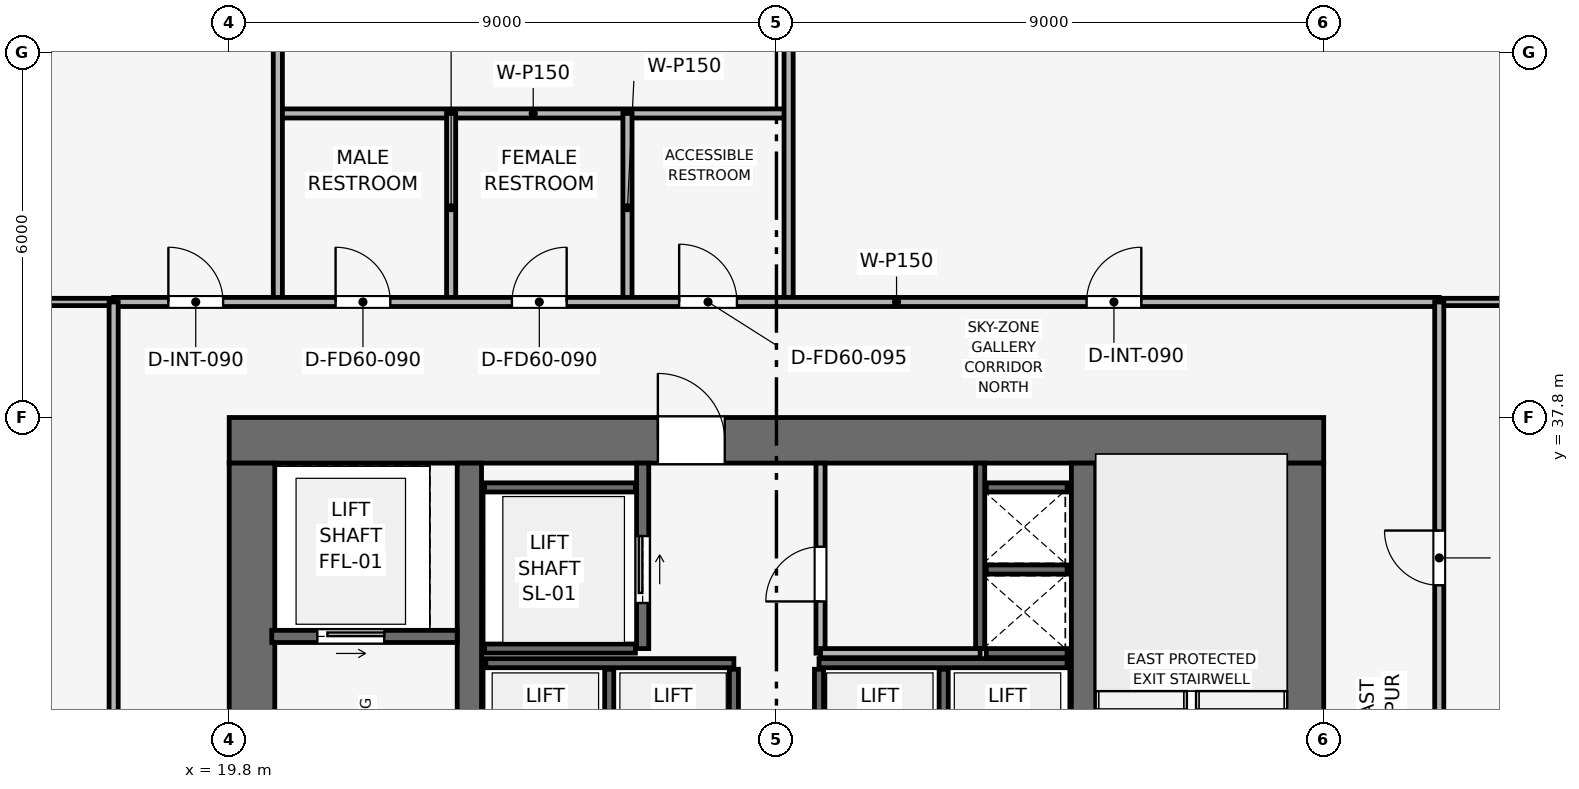
"""IFC4 building model, lengths in metres.
Left out: names, types, materials, properties, quantities, classifications, styles, units other than length and angle.
Written with IfcOpenShell. Run it as: python <this file> out.ifc"""

import sys

from ifc_helpers import new_model, si_unit, direction, frame, frame_2d, origin, place, context, subcontext, project, spatial, rectangle, extrude, element, fill, save


model = new_model("IFC4")
c1 = context("Model", 3, precision=1e-05, world=origin(), true_north=direction((0.0, 1.0)))
c2 = subcontext(c1, "Body", "Model", "MODEL_VIEW")
j1 = project(units=[si_unit("LENGTHUNIT", "METRE"), si_unit("PLANEANGLEUNIT", "RADIAN")], contexts=[c1])
p1 = place(None, origin())
s1 = spatial("IfcSite", under=j1, at=p1, CompositionType="ELEMENT")
p2 = place(p1, origin())
s2 = spatial("IfcBuilding", under=s1, at=p2, CompositionType="ELEMENT")
p3 = place(p2, frame((0.0, 0.0, 250.35)))
s3 = spatial("IfcBuildingStorey", under=s2, at=p3, CompositionType="ELEMENT", Elevation=250.35)
p4 = place(p3, frame((19.8, 37.425, 0.0), z_axis=(0.0, 0.0, 1.0), x_axis=(1.0, 0.0, 0.0)))
e1 = element("IfcWall", 1, at=p4, inside=s3, PredefinedType="SHEAR", context=c2, shape_type="SweptSolid", body=[
    extrude(rectangle(XDim=18.0, YDim=0.75, at=frame_2d((9.0, 0.0))), origin(), (0.0, 0.0, 1.0), 3.75),
])
p5 = place(p4, frame((7.05, 0.0, 0.0)))
e2 = element("IfcOpeningElement", 2, at=p5, cuts=e1, PredefinedType="OPENING", context=c2, shape_type="SweptSolid", body=[
    extrude(rectangle(XDim=1.1, YDim=2.15, at=frame_2d((0.55, 1.075))), frame((0.0, 0.385, 0.0), z_axis=(0.0, -1.0, 0.0), x_axis=(1.0, 0.0, 0.0)), (0.0, 0.0, 1.0), 0.77),
])
p6 = place(p3, frame((20.175, 20.55, 0.0), z_axis=(0.0, 0.0, 1.0), x_axis=(0.0, 1.0, 0.0)))
e3 = element("IfcWall", 3, at=p6, inside=s3, PredefinedType="SHEAR", context=c2, shape_type="SweptSolid", body=[
    extrude(rectangle(XDim=16.5, YDim=0.75, at=frame_2d((8.25, 0.0))), origin(), (0.0, 0.0, 1.0), 3.75),
])
p7 = place(p6, frame((10.25, 0.0, 0.0)))
e4 = element("IfcOpeningElement", 4, at=p7, cuts=e3, PredefinedType="OPENING", context=c2, shape_type="SweptSolid", body=[
    extrude(rectangle(XDim=1.1, YDim=2.15, at=frame_2d((0.55, 1.075))), frame((0.0, 0.385, 0.0), z_axis=(0.0, -1.0, 0.0), x_axis=(1.0, 0.0, 0.0)), (0.0, 0.0, 1.0), 0.77),
])
p8 = place(p3, frame((37.425, 20.55, 0.0), z_axis=(0.0, 0.0, 1.0), x_axis=(0.0, 1.0, 0.0)))
e5 = element("IfcWall", 5, at=p8, inside=s3, PredefinedType="SHEAR", context=c2, shape_type="SweptSolid", body=[
    extrude(rectangle(XDim=16.5, YDim=0.75, at=frame_2d((8.25, 0.0))), origin(), (0.0, 0.0, 1.0), 3.75),
])
p9 = place(p8, frame((4.75, 0.0, 0.0)))
e6 = element("IfcOpeningElement", 6, at=p9, cuts=e5, PredefinedType="OPENING", context=c2, shape_type="SweptSolid", body=[
    extrude(rectangle(XDim=1.1, YDim=2.15, at=frame_2d((0.55, 1.075))), frame((0.0, 0.385, 0.0), z_axis=(0.0, -1.0, 0.0), x_axis=(1.0, 0.0, 0.0)), (0.0, 0.0, 1.0), 0.77),
])
for number, where, z_axis, x_axis in (
    (7, (23.75, 20.55, 0.0), (0.0, 0.0, 1.0), (0.0, 1.0, 0.0)),
    (8, (33.85, 20.55, 0.0), (0.0, 0.0, 1.0), (0.0, 1.0, 0.0)),
):
    element("IfcWall", number, at=place(p3, frame(where, z_axis=z_axis, x_axis=x_axis)), inside=s3, PredefinedType="SHEAR", context=c2, shape_type="SweptSolid", body=[
        extrude(rectangle(XDim=16.5, YDim=0.4, at=frame_2d((8.25, 0.0))), origin(), (0.0, 0.0, 1.0), 3.75),
    ])
p10 = place(p3, frame((32.15, 34.0, 0.0), z_axis=(0.0, 0.0, 1.0), x_axis=(0.0, 1.0, 0.0)))
e9 = element("IfcWall", 9, at=p10, inside=s3, PredefinedType="SHEAR", context=c2, shape_type="SweptSolid", body=[
    extrude(rectangle(XDim=3.05, YDim=0.15, at=frame_2d((1.525, 0.0))), origin(), (0.0, 0.0, 1.0), 3.5),
])
for number, where, z_axis, x_axis in (
    (10, (32.25, 33.925, 0.0), (0.0, 0.0, 1.0), (1.0, 0.0, 0.0)),
    (11, (32.25, 35.3, 0.0), (0.0, 0.0, 1.0), (1.0, 0.0, 0.0)),
):
    element("IfcWall", number, at=place(p3, frame(where, z_axis=z_axis, x_axis=x_axis)), inside=s3, PredefinedType="SHEAR", context=c2, shape_type="SweptSolid", body=[
        extrude(rectangle(XDim=1.33, YDim=0.15, at=frame_2d((0.665, 0.0))), origin(), (0.0, 0.0, 1.0), 3.5),
    ])
p11 = place(p3, frame((20.5, 34.2, 0.0), z_axis=(0.0, 0.0, 1.0), x_axis=(1.0, 0.0, 0.0)))
e12 = element("IfcWall", 12, at=p11, inside=s3, PredefinedType="SHEAR", context=c2, shape_type="SweptSolid", body=[
    extrude(rectangle(XDim=3.05, YDim=0.2, at=frame_2d((1.525, 0.0))), origin(), (0.0, 0.0, 1.0), 3.5),
])
p12 = place(p11, frame((0.75, 0.0, 0.0)))
e13 = element("IfcOpeningElement", 13, at=p12, cuts=e12, PredefinedType="OPENING", context=c2, shape_type="SweptSolid", body=[
    extrude(rectangle(XDim=1.1, YDim=2.15, at=frame_2d((0.55, 1.075))), frame((0.0, 0.11, 0.0), z_axis=(0.0, -1.0, 0.0), x_axis=(1.0, 0.0, 0.0)), (0.0, 0.0, 1.0), 0.22),
])
p13 = place(p3, frame((26.6, 34.0, 0.0), z_axis=(0.0, 0.0, 1.0), x_axis=(0.0, 1.0, 0.0)))
e14 = element("IfcWall", 14, at=p13, inside=s3, PredefinedType="SHEAR", context=c2, shape_type="SweptSolid", body=[
    extrude(rectangle(XDim=3.05, YDim=0.2, at=frame_2d((1.525, 0.0))), origin(), (0.0, 0.0, 1.0), 3.5),
])
p14 = place(p13, frame((0.75, 0.0, 0.0)))
e15 = element("IfcOpeningElement", 15, at=p14, cuts=e14, PredefinedType="OPENING", context=c2, shape_type="SweptSolid", body=[
    extrude(rectangle(XDim=1.1, YDim=2.15, at=frame_2d((0.55, 1.075))), frame((0.0, 0.11, 0.0), z_axis=(0.0, -1.0, 0.0), x_axis=(1.0, 0.0, 0.0)), (0.0, 0.0, 1.0), 0.22),
])
for number, where, z_axis, x_axis in (
    (16, (24.0, 34.0, 0.0), (0.0, 0.0, 1.0), (1.0, 0.0, 0.0)),
    (17, (24.0, 36.65, 0.0), (0.0, 0.0, 1.0), (1.0, 0.0, 0.0)),
):
    element("IfcWall", number, at=place(p3, frame(where, z_axis=z_axis, x_axis=x_axis)), inside=s3, PredefinedType="SHEAR", context=c2, shape_type="SweptSolid", body=[
        extrude(rectangle(XDim=2.48, YDim=0.15, at=frame_2d((1.24, 0.0))), origin(), (0.0, 0.0, 1.0), 3.5),
    ])
p15 = place(p3, frame((32.25, 36.65, 0.0), z_axis=(0.0, 0.0, 1.0), x_axis=(1.0, 0.0, 0.0)))
e18 = element("IfcWall", 18, at=p15, inside=s3, PredefinedType="SHEAR", context=c2, shape_type="SweptSolid", body=[
    extrude(rectangle(XDim=1.33, YDim=0.15, at=frame_2d((0.665, 0.0))), origin(), (0.0, 0.0, 1.0), 3.5),
])
for number, where, z_axis, x_axis in (
    (19, (24.02, 33.76, 0.0), (0.0, 0.0, 1.0), (1.0, 0.0, 0.0)),
    (20, (29.5, 33.76, 0.0), (0.0, 0.0, 1.0), (1.0, 0.0, 0.0)),
):
    element("IfcWall", number, at=place(p3, frame(where, z_axis=z_axis, x_axis=x_axis)), inside=s3, PredefinedType="SHEAR", context=c2, shape_type="SweptSolid", body=[
        extrude(rectangle(XDim=4.08, YDim=0.15, at=frame_2d((2.04, 0.0))), origin(), (0.0, 0.0, 1.0), 3.5),
    ])
for number, where, z_axis, x_axis in (
    (21, (26.05, 31.42, 0.0), (0.0, 0.0, 1.0), (0.0, 1.0, 0.0)),
    (22, (28.1, 31.42, 0.0), (0.0, 0.0, 1.0), (0.0, 1.0, 0.0)),
    (23, (29.5, 31.42, 0.0), (0.0, 0.0, 1.0), (0.0, 1.0, 0.0)),
    (24, (31.55, 31.42, 0.0), (0.0, 0.0, 1.0), (0.0, 1.0, 0.0)),
):
    element("IfcWall", number, at=place(p3, frame(where, z_axis=z_axis, x_axis=x_axis)), inside=s3, PredefinedType="SHEAR", context=c2, shape_type="SweptSolid", body=[
        extrude(rectangle(XDim=2.24, YDim=0.15, at=frame_2d((1.12, 0.0))), origin(), (0.0, 0.0, 1.0), 3.5),
    ])
p16 = place(p3, frame((29.525, 33.925, 0.0), z_axis=(0.0, 0.0, 1.0), x_axis=(0.0, 1.0, 0.0)))
e25 = element("IfcWall", 25, at=p16, inside=s3, PredefinedType="PARTITIONING", context=c2, shape_type="SweptSolid", body=[
    extrude(rectangle(XDim=3.125, YDim=0.15, at=frame_2d((1.562, 0.0))), origin(), (0.0, 0.0, 1.0), 3.5),
])
p17 = place(p16, frame((0.85, 0.0, 0.0)))
e26 = element("IfcOpeningElement", 26, at=p17, cuts=e25, PredefinedType="OPENING", context=c2, shape_type="SweptSolid", body=[
    extrude(rectangle(XDim=0.9, YDim=2.1, at=frame_2d((0.45, 1.05))), frame((0.0, 0.085, 0.0), z_axis=(0.0, -1.0, 0.0), x_axis=(1.0, 0.0, 0.0)), (0.0, 0.0, 1.0), 0.17),
])
p18 = place(p3, frame((29.525, 33.925, 0.0), z_axis=(0.0, 0.0, 1.0), x_axis=(1.0, 0.0, 0.0)))
e27 = element("IfcWall", 27, at=p18, inside=s3, PredefinedType="PARTITIONING", context=c2, shape_type="SweptSolid", body=[
    extrude(rectangle(XDim=2.625, YDim=0.15, at=frame_2d((1.312, 0.0))), origin(), (0.0, 0.0, 1.0), 3.5),
])
p19 = place(p3, frame((20.6, 42.8, 0.0), z_axis=(0.0, 0.0, 1.0), x_axis=(1.0, 0.0, 0.0)))
e28 = element("IfcWall", 28, at=p19, inside=s3, PredefinedType="PARTITIONING", context=c2, shape_type="SweptSolid", body=[
    extrude(rectangle(XDim=8.4, YDim=0.15, at=frame_2d((4.2, 0.0))), origin(), (0.0, 0.0, 1.0), 3.085),
])
p20 = place(p3, frame((20.6, 39.7, 0.0), z_axis=(0.0, 0.0, 1.0), x_axis=(0.0, 1.0, 0.0)))
e29 = element("IfcWall", 29, at=p20, inside=s3, PredefinedType="PARTITIONING", context=c2, shape_type="SweptSolid", body=[
    extrude(rectangle(XDim=13.87, YDim=0.15, at=frame_2d((6.935, 0.0))), origin(), (0.0, 0.0, 1.0), 3.085),
])
p21 = place(p20, frame((8.035, 0.0, 0.0)))
e30 = element("IfcOpeningElement", 30, at=p21, cuts=e29, PredefinedType="OPENING", context=c2, shape_type="SweptSolid", body=[
    extrude(rectangle(XDim=0.9, YDim=2.1, at=frame_2d((0.45, 1.05))), frame((0.0, 0.085, 0.0), z_axis=(0.0, -1.0, 0.0), x_axis=(1.0, 0.0, 0.0)), (0.0, 0.0, 1.0), 0.17),
])
p22 = place(p3, frame((29.0, 39.7, 0.0), z_axis=(0.0, 0.0, 1.0), x_axis=(0.0, 1.0, 0.0)))
e31 = element("IfcWall", 31, at=p22, inside=s3, PredefinedType="PARTITIONING", context=c2, shape_type="SweptSolid", body=[
    extrude(rectangle(XDim=13.87, YDim=0.15, at=frame_2d((6.935, 0.0))), origin(), (0.0, 0.0, 1.0), 2.985),
])
for number, where, z_axis, x_axis in (
    (32, (23.45, 39.7, 0.0), (0.0, 0.0, 1.0), (0.0, 1.0, 0.0)),
    (33, (26.35, 39.7, 0.0), (0.0, 0.0, 1.0), (0.0, 1.0, 0.0)),
):
    element("IfcWall", number, at=place(p3, frame(where, z_axis=z_axis, x_axis=x_axis)), inside=s3, PredefinedType="PARTITIONING", context=c2, shape_type="SweptSolid", body=[
        extrude(rectangle(XDim=3.1, YDim=0.15, at=frame_2d((1.55, 0.0))), origin(), (0.0, 0.0, 1.0), 3.5),
    ])
p23 = place(p3, frame((4.03, 39.7, 0.0), z_axis=(0.0, 0.0, 1.0), x_axis=(1.0, 0.0, 0.0)))
e34 = element("IfcWall", 34, at=p23, inside=s3, PredefinedType="PARTITIONING", context=c2, shape_type="SweptSolid", body=[
    extrude(rectangle(XDim=13.87, YDim=0.12, at=frame_2d((6.935, 0.0))), origin(), (0.0, 0.0, 1.0), 3.085),
])
p24 = place(p3, frame((39.7, 39.7, 0.0), z_axis=(0.0, 0.0, 1.0), x_axis=(1.0, 0.0, 0.0)))
e35 = element("IfcWall", 35, at=p24, inside=s3, PredefinedType="PARTITIONING", context=c2, shape_type="SweptSolid", body=[
    extrude(rectangle(XDim=13.87, YDim=0.12, at=frame_2d((6.935, 0.0))), origin(), (0.0, 0.0, 1.0), 3.085),
])
p25 = place(p3, frame((17.9, 39.7, 0.0), z_axis=(0.0, 0.0, 1.0), x_axis=(1.0, 0.0, 0.0)))
e36 = element("IfcWall", 36, at=p25, inside=s3, PredefinedType="PARTITIONING", context=c2, shape_type="SweptSolid", body=[
    extrude(rectangle(XDim=21.8, YDim=0.15, at=frame_2d((10.9, 0.0))), origin(), (0.0, 0.0, 1.0), 3.085),
])
p26 = place(p25, frame((0.9, 0.0, 0.0)))
e37 = element("IfcOpeningElement", 37, at=p26, cuts=e36, PredefinedType="OPENING", context=c2, shape_type="SweptSolid", body=[
    extrude(rectangle(XDim=0.9, YDim=2.1, at=frame_2d((0.45, 1.05))), frame((0.0, 0.085, 0.0), z_axis=(0.0, -1.0, 0.0), x_axis=(1.0, 0.0, 0.0)), (0.0, 0.0, 1.0), 0.17),
])
p27 = place(p25, frame((3.65, 0.0, 0.0)))
e38 = element("IfcOpeningElement", 38, at=p27, cuts=e36, PredefinedType="OPENING", context=c2, shape_type="SweptSolid", body=[
    extrude(rectangle(XDim=0.9, YDim=2.1, at=frame_2d((0.45, 1.05))), frame((0.0, 0.085, 0.0), z_axis=(0.0, -1.0, 0.0), x_axis=(1.0, 0.0, 0.0)), (0.0, 0.0, 1.0), 0.17),
])
p28 = place(p25, frame((6.55, 0.0, 0.0)))
e39 = element("IfcOpeningElement", 39, at=p28, cuts=e36, PredefinedType="OPENING", context=c2, shape_type="SweptSolid", body=[
    extrude(rectangle(XDim=0.9, YDim=2.1, at=frame_2d((0.45, 1.05))), frame((0.0, 0.085, 0.0), z_axis=(0.0, -1.0, 0.0), x_axis=(1.0, 0.0, 0.0)), (0.0, 0.0, 1.0), 0.17),
])
p29 = place(p25, frame((9.3, 0.0, 0.0)))
e40 = element("IfcOpeningElement", 40, at=p29, cuts=e36, PredefinedType="OPENING", context=c2, shape_type="SweptSolid", body=[
    extrude(rectangle(XDim=0.95, YDim=2.1, at=frame_2d((0.475, 1.05))), frame((0.0, 0.085, 0.0), z_axis=(0.0, -1.0, 0.0), x_axis=(1.0, 0.0, 0.0)), (0.0, 0.0, 1.0), 0.17),
])
p30 = place(p25, frame((16.0, 0.0, 0.0)))
e41 = element("IfcOpeningElement", 41, at=p30, cuts=e36, PredefinedType="OPENING", context=c2, shape_type="SweptSolid", body=[
    extrude(rectangle(XDim=0.9, YDim=2.1, at=frame_2d((0.45, 1.05))), frame((0.0, 0.085, 0.0), z_axis=(0.0, -1.0, 0.0), x_axis=(1.0, 0.0, 0.0)), (0.0, 0.0, 1.0), 0.17),
])
p31 = place(p3, frame((17.9, 10.8, 0.0), z_axis=(0.0, 0.0, 1.0), x_axis=(0.0, 1.0, 0.0)))
e42 = element("IfcWall", 42, at=p31, inside=s3, PredefinedType="PARTITIONING", context=c2, shape_type="SweptSolid", body=[
    extrude(rectangle(XDim=28.9, YDim=0.15, at=frame_2d((14.45, 0.0))), origin(), (0.0, 0.0, 1.0), 3.085),
])
p32 = place(p31, frame((14.0, 0.0, 0.0)))
e43 = element("IfcOpeningElement", 43, at=p32, cuts=e42, PredefinedType="OPENING", context=c2, shape_type="SweptSolid", body=[
    extrude(rectangle(XDim=0.9, YDim=2.1, at=frame_2d((0.45, 1.05))), frame((0.0, 0.085, 0.0), z_axis=(0.0, -1.0, 0.0), x_axis=(1.0, 0.0, 0.0)), (0.0, 0.0, 1.0), 0.17),
])
p33 = place(p3, frame((39.7, 24.4, 0.0), z_axis=(0.0, 0.0, 1.0), x_axis=(0.0, 1.0, 0.0)))
e44 = element("IfcWall", 44, at=p33, inside=s3, PredefinedType="PARTITIONING", context=c2, shape_type="SweptSolid", body=[
    extrude(rectangle(XDim=15.3, YDim=0.15, at=frame_2d((7.65, 0.0))), origin(), (0.0, 0.0, 1.0), 3.085),
])
p34 = place(p33, frame((0.7, 0.0, 0.0)))
e45 = element("IfcOpeningElement", 45, at=p34, cuts=e44, PredefinedType="OPENING", context=c2, shape_type="SweptSolid", body=[
    extrude(rectangle(XDim=0.9, YDim=2.1, at=frame_2d((0.45, 1.05))), frame((0.0, 0.085, 0.0), z_axis=(0.0, -1.0, 0.0), x_axis=(1.0, 0.0, 0.0)), (0.0, 0.0, 1.0), 0.17),
])
p35 = place(p33, frame((4.141, 0.0, 0.0)))
e46 = element("IfcOpeningElement", 46, at=p35, cuts=e44, PredefinedType="OPENING", context=c2, shape_type="SweptSolid", body=[
    extrude(rectangle(XDim=0.9, YDim=2.1, at=frame_2d((0.45, 1.05))), frame((0.0, 0.085, 0.0), z_axis=(0.0, -1.0, 0.0), x_axis=(1.0, 0.0, 0.0)), (0.0, 0.0, 1.0), 0.17),
])
p36 = place(p33, frame((10.641, 0.0, 0.0)))
e47 = element("IfcOpeningElement", 47, at=p36, cuts=e44, PredefinedType="OPENING", context=c2, shape_type="SweptSolid", body=[
    extrude(rectangle(XDim=0.9, YDim=2.1, at=frame_2d((0.45, 1.05))), frame((0.0, 0.085, 0.0), z_axis=(0.0, -1.0, 0.0), x_axis=(1.0, 0.0, 0.0)), (0.0, 0.0, 1.0), 0.17),
])
p37 = place(p12, origin())
e48 = element("IfcDoor", 48, at=p37, inside=s3, OperationType="SLIDING_TO_RIGHT", PredefinedType="DOOR", context=c2, shape_type="SweptSolid", body=[
    extrude(rectangle(XDim=1.1, YDim=2.15, at=frame_2d((0.55, 1.075))), frame((0.0, 0.025, 0.0), z_axis=(0.0, -1.0, 0.0), x_axis=(1.0, 0.0, 0.0)), (0.0, 0.0, 1.0), 0.05),
])
fill(e13, e48)
p38 = place(p14, origin())
e49 = element("IfcDoor", 49, at=p38, inside=s3, OperationType="SLIDING_TO_RIGHT", PredefinedType="DOOR", context=c2, shape_type="SweptSolid", body=[
    extrude(rectangle(XDim=1.1, YDim=2.15, at=frame_2d((0.55, 1.075))), frame((0.0, 0.025, 0.0), z_axis=(0.0, -1.0, 0.0), x_axis=(1.0, 0.0, 0.0)), (0.0, 0.0, 1.0), 0.05),
])
fill(e15, e49)
p39 = place(p17, origin())
e50 = element("IfcDoor", 50, at=p39, inside=s3, OperationType="SINGLE_SWING_LEFT", PredefinedType="DOOR", context=c2, shape_type="SweptSolid", body=[
    extrude(rectangle(XDim=0.9, YDim=2.1, at=frame_2d((0.45, 1.05))), frame((0.0, 0.025, 0.0), z_axis=(0.0, -1.0, 0.0), x_axis=(1.0, 0.0, 0.0)), (0.0, 0.0, 1.0), 0.05),
])
fill(e26, e50)
p40 = place(p26, origin())
e51 = element("IfcDoor", 51, at=p40, inside=s3, OperationType="SINGLE_SWING_LEFT", PredefinedType="DOOR", context=c2, shape_type="SweptSolid", body=[
    extrude(rectangle(XDim=0.9, YDim=2.1, at=frame_2d((0.45, 1.05))), frame((0.0, 0.025, 0.0), z_axis=(0.0, -1.0, 0.0), x_axis=(1.0, 0.0, 0.0)), (0.0, 0.0, 1.0), 0.05),
])
fill(e37, e51)
p41 = place(p27, origin())
e52 = element("IfcDoor", 52, at=p41, inside=s3, OperationType="SINGLE_SWING_LEFT", PredefinedType="DOOR", context=c2, shape_type="SweptSolid", body=[
    extrude(rectangle(XDim=0.9, YDim=2.1, at=frame_2d((0.45, 1.05))), frame((0.0, 0.025, 0.0), z_axis=(0.0, -1.0, 0.0), x_axis=(1.0, 0.0, 0.0)), (0.0, 0.0, 1.0), 0.05),
])
fill(e38, e52)
p42 = place(p28, origin())
e53 = element("IfcDoor", 53, at=p42, inside=s3, OperationType="SINGLE_SWING_RIGHT", PredefinedType="DOOR", context=c2, shape_type="SweptSolid", body=[
    extrude(rectangle(XDim=0.9, YDim=2.1, at=frame_2d((0.45, 1.05))), frame((0.0, 0.025, 0.0), z_axis=(0.0, -1.0, 0.0), x_axis=(1.0, 0.0, 0.0)), (0.0, 0.0, 1.0), 0.05),
])
fill(e39, e53)
p43 = place(p29, origin())
e54 = element("IfcDoor", 54, at=p43, inside=s3, OperationType="SINGLE_SWING_LEFT", PredefinedType="DOOR", context=c2, shape_type="SweptSolid", body=[
    extrude(rectangle(XDim=0.95, YDim=2.1, at=frame_2d((0.475, 1.05))), frame((0.0, 0.025, 0.0), z_axis=(0.0, -1.0, 0.0), x_axis=(1.0, 0.0, 0.0)), (0.0, 0.0, 1.0), 0.05),
])
fill(e40, e54)
p44 = place(p30, origin())
e55 = element("IfcDoor", 55, at=p44, inside=s3, OperationType="SINGLE_SWING_RIGHT", PredefinedType="DOOR", context=c2, shape_type="SweptSolid", body=[
    extrude(rectangle(XDim=0.9, YDim=2.1, at=frame_2d((0.45, 1.05))), frame((0.0, 0.025, 0.0), z_axis=(0.0, -1.0, 0.0), x_axis=(1.0, 0.0, 0.0)), (0.0, 0.0, 1.0), 0.05),
])
fill(e41, e55)
p45 = place(p36, origin())
e56 = element("IfcDoor", 56, at=p45, inside=s3, OperationType="SINGLE_SWING_RIGHT", PredefinedType="DOOR", context=c2, shape_type="SweptSolid", body=[
    extrude(rectangle(XDim=0.9, YDim=2.1, at=frame_2d((0.45, 1.05))), frame((0.0, 0.025, 0.0), z_axis=(0.0, -1.0, 0.0), x_axis=(1.0, 0.0, 0.0)), (0.0, 0.0, 1.0), 0.05),
])
fill(e47, e56)
p46 = place(p5, origin())
e57 = element("IfcDoor", 57, at=p46, inside=s3, OperationType="SINGLE_SWING_LEFT", PredefinedType="DOOR", context=c2, shape_type="SweptSolid", body=[
    extrude(rectangle(XDim=1.1, YDim=2.15, at=frame_2d((0.55, 1.075))), frame((0.0, 0.025, 0.0), z_axis=(0.0, -1.0, 0.0), x_axis=(1.0, 0.0, 0.0)), (0.0, 0.0, 1.0), 0.05),
])
fill(e2, e57)
save(model, sys.argv[1])
